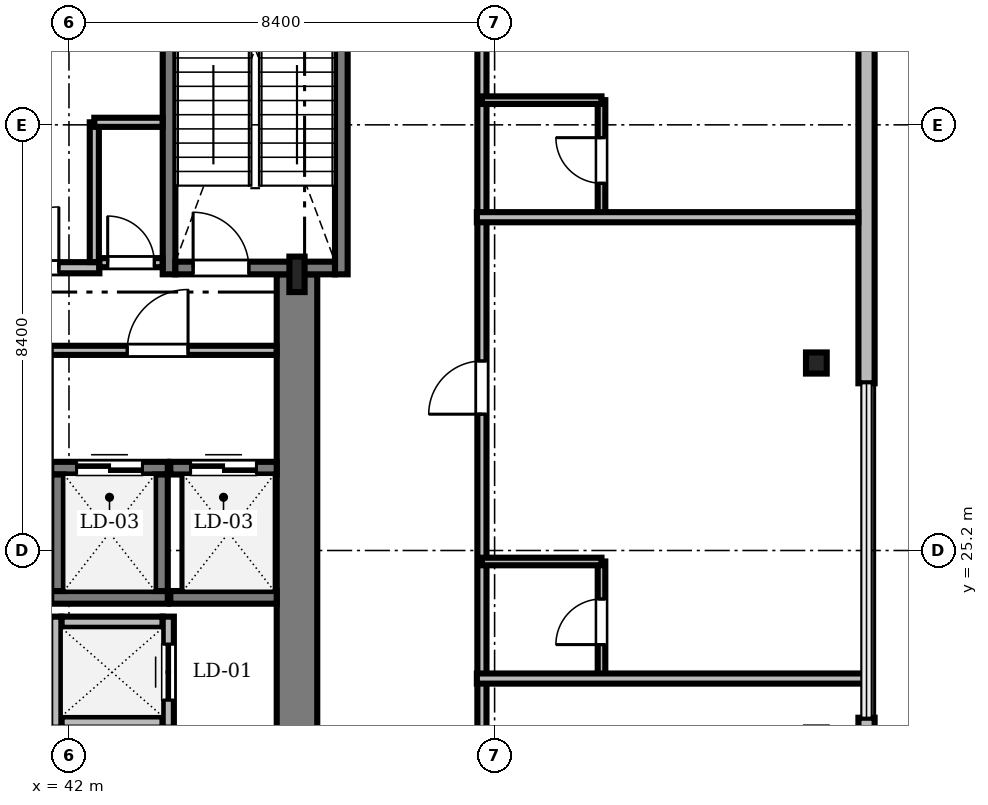
"""IFC4 building model, lengths in metres.
Left out: names, types, materials, properties, quantities, classifications, styles, units other than length and angle.
Written with IfcOpenShell. Run it as: python <this file> out.ifc"""

import sys

from ifc_helpers import new_model, si_unit, direction, frame, frame_2d, origin, origin_2d, place, context, subcontext, project, spatial, rectangle, i_section, extrude, source, transform, mapped, element, fill, save


model = new_model("IFC4")
c1 = context("Model", 3, precision=1e-05, world=origin(), true_north=direction((0.0, 1.0)))
c2 = subcontext(c1, "Body", "Model", "MODEL_VIEW")
j1 = project(units=[si_unit("LENGTHUNIT", "METRE"), si_unit("PLANEANGLEUNIT", "RADIAN")], contexts=[c1])
p1 = place(None, origin())
s1 = spatial("IfcSite", under=j1, at=p1, CompositionType="ELEMENT")
p2 = place(p1, origin())
s2 = spatial("IfcBuilding", under=s1, at=p2, CompositionType="ELEMENT")
p3 = place(p2, frame((0.0, 0.0, 222.3)))
s3 = spatial("IfcBuildingStorey", under=s2, at=p3, CompositionType="ELEMENT", Elevation=222.3)
m1 = source(origin(), c2, "Body", "SweptSolid", [
    extrude(rectangle(XDim=13.15, YDim=0.8, at=frame_2d((6.575, 0.0))), origin(), (0.0, 0.0, 1.0), 3.53),
])
p4 = place(p3, frame((46.5, 17.5, 0.0), z_axis=(0.0, 0.0, 1.0), x_axis=(0.0, 1.0, 0.0)))
e1 = element("IfcWall", 1, at=p4, inside=s3, PredefinedType="SHEAR", context=c2, shape_type="MappedRepresentation", body=[
    mapped(m1, transform((0.0, 0.0, 0.0), scale=1.0)),
])
m2 = source(origin(), c2, "Body", "SweptSolid", [
    extrude(i_section(OverallWidth=0.3, OverallDepth=0.7, WebThickness=0.017, FlangeThickness=0.032, FilletRadius=0.027, at=origin_2d()), origin(), (0.0, 0.0, 1.0), 3.53),
])
p5 = place(p3, frame((46.5, 30.65, 0.0), z_axis=(0.0, 0.0, 1.0), x_axis=(1.0, 0.0, 0.0)))
e2 = element("IfcColumn", 2, at=p5, inside=s3, PredefinedType="COLUMN", context=c2, shape_type="MappedRepresentation", body=[
    mapped(m2, transform((0.0, 0.0, 0.0), scale=1.0)),
])
m3 = source(origin(), c2, "Body", "SweptSolid", [
    extrude(i_section(OverallWidth=0.409, OverallDepth=0.417, WebThickness=0.021, FlangeThickness=0.033, FilletRadius=0.015, at=origin_2d()), origin(), (0.0, 0.0, 1.0), 3.53),
])
p6 = place(p3, frame((56.75, 28.9, 0.0), z_axis=(0.0, 0.0, 1.0), x_axis=(1.0, 0.0, 0.0)))
e3 = element("IfcColumn", 3, at=p6, inside=s3, PredefinedType="COLUMN", context=c2, shape_type="MappedRepresentation", body=[
    mapped(m3, transform((0.0, 0.0, 0.0), scale=1.0)),
])
m4 = source(origin(), c2, "Body", "SweptSolid", [
    extrude(rectangle(XDim=15.6, YDim=0.32, at=frame_2d((7.8, 0.0))), origin(), (0.0, 0.0, 1.0), 3.53),
])
p7 = place(p3, frame((57.74, 6.3, 0.0), z_axis=(0.0, 0.0, 1.0), x_axis=(0.0, 1.0, 0.0)))
e4 = element("IfcWall", 4, at=p7, inside=s3, PredefinedType="SOLIDWALL", context=c2, shape_type="MappedRepresentation", body=[
    mapped(m4, transform((0.0, 0.0, 0.0), scale=1.0)),
])
m5 = source(origin(), c2, "Body", "SweptSolid", [
    extrude(rectangle(XDim=1.4, YDim=2.3, at=frame_2d((0.7, 1.15))), frame((0.0, 0.17, 0.0), z_axis=(0.0, -1.0, 0.0), x_axis=(1.0, 0.0, 0.0)), (0.0, 0.0, 1.0), 0.34),
])
p8 = place(p7, frame((9.61, 0.0, 0.0)))
e5 = element("IfcOpeningElement", 5, at=p8, cuts=e4, PredefinedType="OPENING", context=c2, shape_type="MappedRepresentation", body=[
    mapped(m5, transform((0.0, 0.0, 0.0), scale=1.0)),
])
m6 = source(origin(), c2, "Body", "SweptSolid", [
    extrude(rectangle(XDim=2.2, YDim=2.4, at=frame_2d((1.1, 1.2))), frame((0.0, 0.17, 0.0), z_axis=(0.0, -1.0, 0.0), x_axis=(1.0, 0.0, 0.0)), (0.0, 0.0, 1.0), 0.34),
])
p9 = place(p7, frame((3.005, 0.0, 0.72)))
e6 = element("IfcOpeningElement", 6, at=p9, cuts=e4, PredefinedType="OPENING", context=c2, shape_type="MappedRepresentation", body=[
    mapped(m6, transform((0.0, 0.0, 0.0), scale=1.0)),
])
m7 = source(origin(), c2, "Body", "SweptSolid", [
    extrude(rectangle(XDim=15.6, YDim=0.32, at=frame_2d((7.8, 0.0))), origin(), (0.0, 0.0, 1.0), 3.53),
])
p10 = place(p3, frame((57.74, 28.5, 0.0), z_axis=(0.0, 0.0, 1.0), x_axis=(0.0, 1.0, 0.0)))
e7 = element("IfcWall", 7, at=p10, inside=s3, PredefinedType="SOLIDWALL", context=c2, shape_type="MappedRepresentation", body=[
    mapped(m7, transform((0.0, 0.0, 0.0), scale=1.0)),
])
p11 = place(p10, frame((10.395, 0.0, 0.72)))
e8 = element("IfcOpeningElement", 8, at=p11, cuts=e7, PredefinedType="OPENING", context=c2, shape_type="MappedRepresentation", body=[
    mapped(m6, transform((0.0, 0.0, 0.0), scale=1.0)),
])
m8 = source(origin(), c2, "Body", "SweptSolid", [
    extrude(rectangle(XDim=9.25, YDim=0.25, at=frame_2d((4.625, 0.0))), origin(), (0.0, 0.0, 1.0), 3.55),
])
for number, where, z_axis, x_axis in (
    (9, (43.975, 30.65, 0.0), (0.0, 0.0, 1.0), (0.0, 1.0, 0.0)),
    (10, (47.375, 30.65, 0.0), (0.0, 0.0, 1.0), (0.0, 1.0, 0.0)),
):
    element("IfcWall", number, at=place(p3, frame(where, z_axis=z_axis, x_axis=x_axis)), inside=s3, PredefinedType="SOLIDWALL", context=c2, shape_type="MappedRepresentation", body=[
        mapped(m8, transform((0.0, 0.0, 0.0), scale=1.0)),
    ])
m9 = source(origin(), c2, "Body", "SweptSolid", [
    extrude(rectangle(XDim=3.15, YDim=0.25, at=frame_2d((1.575, 0.0))), origin(), (0.0, 0.0, 1.0), 3.55),
])
p12 = place(p3, frame((44.1, 30.775, 0.0), z_axis=(0.0, 0.0, 1.0), x_axis=(1.0, 0.0, 0.0)))
e11 = element("IfcWall", 11, at=p12, inside=s3, PredefinedType="SOLIDWALL", context=c2, shape_type="MappedRepresentation", body=[
    mapped(m9, transform((0.0, 0.0, 0.0), scale=1.0)),
])
m10 = source(origin(), c2, "Body", "SweptSolid", [
    extrude(rectangle(XDim=1.1, YDim=2.2, at=frame_2d((0.55, 1.1))), frame((0.0, 0.135, 0.0), z_axis=(0.0, -1.0, 0.0), x_axis=(1.0, 0.0, 0.0)), (0.0, 0.0, 1.0), 0.27),
])
p13 = place(p12, frame((0.35, 0.0, 0.0)))
e12 = element("IfcOpeningElement", 12, at=p13, cuts=e11, PredefinedType="OPENING", context=c2, shape_type="MappedRepresentation", body=[
    mapped(m10, transform((0.0, 0.0, 0.0), scale=1.0)),
])
m11 = source(origin(), c2, "Body", "SweptSolid", [
    extrude(rectangle(XDim=2.8, YDim=0.22, at=frame_2d((1.4, 0.0))), origin(), (0.0, 0.0, 1.0), 3.53),
])
p14 = place(p3, frame((39.8, 30.78, 0.0), z_axis=(0.0, 0.0, 1.0), x_axis=(1.0, 0.0, 0.0)))
e13 = element("IfcWall", 13, at=p14, inside=s3, PredefinedType="SOLIDWALL", context=c2, shape_type="MappedRepresentation", body=[
    mapped(m11, transform((0.0, 0.0, 0.0), scale=1.0)),
])
m12 = source(origin(), c2, "Body", "SweptSolid", [
    extrude(rectangle(XDim=1.2, YDim=2.2, at=frame_2d((0.6, 1.1))), frame((0.0, 0.12, 0.0), z_axis=(0.0, -1.0, 0.0), x_axis=(1.0, 0.0, 0.0)), (0.0, 0.0, 1.0), 0.24),
])
p15 = place(p14, frame((0.8, 0.0, 0.0)))
e14 = element("IfcOpeningElement", 14, at=p15, cuts=e13, PredefinedType="OPENING", context=c2, shape_type="MappedRepresentation", body=[
    mapped(m12, transform((0.0, 0.0, 0.0), scale=1.0)),
])
m13 = source(origin(), c2, "Body", "SweptSolid", [
    extrude(rectangle(XDim=2.0, YDim=0.22, at=frame_2d((1.0, 0.0))), origin(), (0.0, 0.0, 1.0), 3.53),
])
for number, where, z_axis, x_axis in (
    (15, (41.85, 21.815, 0.0), (0.0, 0.0, 1.0), (1.0, 0.0, 0.0)),
    (16, (41.85, 23.785, 0.0), (0.0, 0.0, 1.0), (1.0, 0.0, 0.0)),
):
    element("IfcWall", number, at=place(p3, frame(where, z_axis=z_axis, x_axis=x_axis)), inside=s3, PredefinedType="SOLIDWALL", context=c2, shape_type="MappedRepresentation", body=[
        mapped(m13, transform((0.0, 0.0, 0.0), scale=1.0)),
    ])
m14 = source(origin(), c2, "Body", "SweptSolid", [
    extrude(rectangle(XDim=2.19, YDim=0.22, at=frame_2d((1.095, 0.0))), origin(), (0.0, 0.0, 1.0), 3.53),
])
p16 = place(p3, frame((41.74, 21.705, 0.0), z_axis=(0.0, 0.0, 1.0), x_axis=(0.0, 1.0, 0.0)))
e17 = element("IfcWall", 17, at=p16, inside=s3, PredefinedType="SOLIDWALL", context=c2, shape_type="MappedRepresentation", body=[
    mapped(m14, transform((0.0, 0.0, 0.0), scale=1.0)),
])
p17 = place(p3, frame((43.96, 21.705, 0.0), z_axis=(0.0, 0.0, 1.0), x_axis=(0.0, 1.0, 0.0)))
e18 = element("IfcWall", 18, at=p17, inside=s3, PredefinedType="SOLIDWALL", context=c2, shape_type="MappedRepresentation", body=[
    mapped(m14, transform((0.0, 0.0, 0.0), scale=1.0)),
])
m15 = source(origin(), c2, "Body", "SweptSolid", [
    extrude(rectangle(XDim=1.1, YDim=2.2, at=frame_2d((0.55, 1.1))), frame((0.0, 0.12, 0.0), z_axis=(0.0, -1.0, 0.0), x_axis=(1.0, 0.0, 0.0)), (0.0, 0.0, 1.0), 0.24),
])
p18 = place(p17, frame((0.545, 0.0, 0.0)))
e19 = element("IfcOpeningElement", 19, at=p18, cuts=e18, PredefinedType="OPENING", context=c2, shape_type="MappedRepresentation", body=[
    mapped(m15, transform((0.0, 0.0, 0.0), scale=1.0)),
])
m16 = source(origin(), c2, "Body", "SweptSolid", [
    extrude(rectangle(XDim=2.3, YDim=0.25, at=frame_2d((1.15, 0.0))), origin(), (0.0, 0.0, 1.0), 3.53),
])
p19 = place(p3, frame((41.65, 24.275, 0.0), z_axis=(0.0, 0.0, 1.0), x_axis=(1.0, 0.0, 0.0)))
e20 = element("IfcWall", 20, at=p19, inside=s3, PredefinedType="SOLIDWALL", context=c2, shape_type="MappedRepresentation", body=[
    mapped(m16, transform((0.0, 0.0, 0.0), scale=1.0)),
])
p20 = place(p3, frame((41.65, 26.825, 0.0), z_axis=(0.0, 0.0, 1.0), x_axis=(1.0, 0.0, 0.0)))
e21 = element("IfcWall", 21, at=p20, inside=s3, PredefinedType="SOLIDWALL", context=c2, shape_type="MappedRepresentation", body=[
    mapped(m16, transform((0.0, 0.0, 0.0), scale=1.0)),
])
m17 = source(origin(), c2, "Body", "SweptSolid", [
    extrude(rectangle(XDim=1.3, YDim=2.3, at=frame_2d((0.65, 1.15))), frame((0.0, 0.135, 0.0), z_axis=(0.0, -1.0, 0.0), x_axis=(1.0, 0.0, 0.0)), (0.0, 0.0, 1.0), 0.27),
])
p21 = place(p20, frame((0.5, 0.0, 0.0)))
e22 = element("IfcOpeningElement", 22, at=p21, cuts=e21, PredefinedType="OPENING", context=c2, shape_type="MappedRepresentation", body=[
    mapped(m17, transform((0.0, 0.0, 0.0), scale=1.0)),
])
for number, where, z_axis, x_axis in (
    (23, (41.775, 24.4, 0.0), (0.0, 0.0, 1.0), (0.0, 1.0, 0.0)),
    (24, (43.825, 24.4, 0.0), (0.0, 0.0, 1.0), (0.0, 1.0, 0.0)),
):
    element("IfcWall", number, at=place(p3, frame(where, z_axis=z_axis, x_axis=x_axis)), inside=s3, PredefinedType="SOLIDWALL", context=c2, shape_type="MappedRepresentation", body=[
        mapped(m16, transform((0.0, 0.0, 0.0), scale=1.0)),
    ])
m18 = source(origin(), c2, "Body", "SweptSolid", [
    extrude(rectangle(XDim=2.1, YDim=0.25, at=frame_2d((1.05, 0.0))), origin(), (0.0, 0.0, 1.0), 3.53),
])
p22 = place(p3, frame((44.0, 24.275, 0.0), z_axis=(0.0, 0.0, 1.0), x_axis=(1.0, 0.0, 0.0)))
e25 = element("IfcWall", 25, at=p22, inside=s3, PredefinedType="SOLIDWALL", context=c2, shape_type="MappedRepresentation", body=[
    mapped(m18, transform((0.0, 0.0, 0.0), scale=1.0)),
])
p23 = place(p3, frame((44.0, 26.825, 0.0), z_axis=(0.0, 0.0, 1.0), x_axis=(1.0, 0.0, 0.0)))
e26 = element("IfcWall", 26, at=p23, inside=s3, PredefinedType="SOLIDWALL", context=c2, shape_type="MappedRepresentation", body=[
    mapped(m18, transform((0.0, 0.0, 0.0), scale=1.0)),
])
p24 = place(p23, frame((0.4, 0.0, 0.0)))
e27 = element("IfcOpeningElement", 27, at=p24, cuts=e26, PredefinedType="OPENING", context=c2, shape_type="MappedRepresentation", body=[
    mapped(m17, transform((0.0, 0.0, 0.0), scale=1.0)),
])
m19 = source(origin(), c2, "Body", "SweptSolid", [
    extrude(rectangle(XDim=27.53, YDim=0.18, at=frame_2d((13.765, 0.0))), origin(), (0.0, 0.0, 1.0), 2.972),
])
p25 = place(p3, frame((50.15, 13.57, 0.0), z_axis=(0.0, 0.0, 1.0), x_axis=(0.0, 1.0, 0.0)))
e28 = element("IfcWall", 28, at=p25, inside=s3, PredefinedType="PARTITIONING", context=c2, shape_type="MappedRepresentation", body=[
    mapped(m19, transform((0.0, 0.0, 0.0), scale=1.0)),
])
m20 = source(origin(), c2, "Body", "SweptSolid", [
    extrude(rectangle(XDim=1.05, YDim=2.2, at=frame_2d((0.525, 1.1))), frame((0.0, 0.1, 0.0), z_axis=(0.0, -1.0, 0.0), x_axis=(1.0, 0.0, 0.0)), (0.0, 0.0, 1.0), 0.2),
])
p26 = place(p25, frame((5.217, 0.0, 0.0)))
e29 = element("IfcOpeningElement", 29, at=p26, cuts=e28, PredefinedType="OPENING", context=c2, shape_type="MappedRepresentation", body=[
    mapped(m20, transform((0.0, 0.0, 0.0), scale=1.0)),
])
p27 = place(p25, frame((14.32, 0.0, 0.0)))
e30 = element("IfcOpeningElement", 30, at=p27, cuts=e28, PredefinedType="OPENING", context=c2, shape_type="MappedRepresentation", body=[
    mapped(m20, transform((0.0, 0.0, 0.0), scale=1.0)),
])
p28 = place(p25, frame((23.423, 0.0, 0.0)))
e31 = element("IfcOpeningElement", 31, at=p28, cuts=e28, PredefinedType="OPENING", context=c2, shape_type="MappedRepresentation", body=[
    mapped(m20, transform((0.0, 0.0, 0.0), scale=1.0)),
])
m21 = source(origin(), c2, "Body", "SweptSolid", [
    extrude(rectangle(XDim=4.548, YDim=0.18, at=frame_2d((2.274, 0.0))), origin(), (0.0, 0.0, 1.0), 3.162),
])
p29 = place(p3, frame((41.55, 29.15, 0.0), z_axis=(0.0, 0.0, 1.0), x_axis=(1.0, 0.0, 0.0)))
e32 = element("IfcWall", 32, at=p29, inside=s3, PredefinedType="PARTITIONING", context=c2, shape_type="MappedRepresentation", body=[
    mapped(m21, transform((0.0, 0.0, 0.0), scale=1.0)),
])
m22 = source(origin(), c2, "Body", "SweptSolid", [
    extrude(rectangle(XDim=1.2, YDim=2.2, at=frame_2d((0.6, 1.1))), frame((0.0, 0.1, 0.0), z_axis=(0.0, -1.0, 0.0), x_axis=(1.0, 0.0, 0.0)), (0.0, 0.0, 1.0), 0.2),
])
p30 = place(p29, frame((1.6, 0.0, 0.0)))
e33 = element("IfcOpeningElement", 33, at=p30, cuts=e32, PredefinedType="OPENING", context=c2, shape_type="MappedRepresentation", body=[
    mapped(m22, transform((0.0, 0.0, 0.0), scale=1.0)),
])
m23 = source(origin(), c2, "Body", "SweptSolid", [
    extrude(rectangle(XDim=2.29, YDim=0.15, at=frame_2d((1.145, 0.0))), origin(), (0.0, 0.0, 1.0), 3.222),
])
p31 = place(p3, frame((52.51, 22.693, 0.0), z_axis=(0.0, 0.0, 1.0), x_axis=(0.0, 1.0, 0.0)))
e34 = element("IfcWall", 34, at=p31, inside=s3, PredefinedType="PARTITIONING", context=c2, shape_type="MappedRepresentation", body=[
    mapped(m23, transform((0.0, 0.0, 0.0), scale=1.0)),
])
m24 = source(origin(), c2, "Body", "SweptSolid", [
    extrude(rectangle(XDim=0.9, YDim=2.1, at=frame_2d((0.45, 1.05))), frame((0.0, 0.085, 0.0), z_axis=(0.0, -1.0, 0.0), x_axis=(1.0, 0.0, 0.0)), (0.0, 0.0, 1.0), 0.17),
])
p32 = place(p31, frame((0.65, 0.0, 0.0)))
e35 = element("IfcOpeningElement", 35, at=p32, cuts=e34, PredefinedType="OPENING", context=c2, shape_type="MappedRepresentation", body=[
    mapped(m24, transform((0.0, 0.0, 0.0), scale=1.0)),
])
m25 = source(origin(), c2, "Body", "SweptSolid", [
    extrude(rectangle(XDim=2.29, YDim=0.15, at=frame_2d((1.145, 0.0))), origin(), (0.0, 0.0, 1.0), 3.53),
])
p33 = place(p3, frame((52.51, 31.797, 0.0), z_axis=(0.0, 0.0, 1.0), x_axis=(0.0, 1.0, 0.0)))
e36 = element("IfcWall", 36, at=p33, inside=s3, PredefinedType="PARTITIONING", context=c2, shape_type="MappedRepresentation", body=[
    mapped(m25, transform((0.0, 0.0, 0.0), scale=1.0)),
])
p34 = place(p33, frame((0.65, 0.0, 0.0)))
e37 = element("IfcOpeningElement", 37, at=p34, cuts=e36, PredefinedType="OPENING", context=c2, shape_type="MappedRepresentation", body=[
    mapped(m24, transform((0.0, 0.0, 0.0), scale=1.0)),
])
m26 = source(origin(), c2, "Body", "SweptSolid", [
    extrude(rectangle(XDim=1.248, YDim=0.18, at=frame_2d((0.624, 0.0))), origin(), (0.0, 0.0, 1.0), 3.53),
])
p35 = place(p3, frame((42.6, 30.88, 0.0), z_axis=(0.0, 0.0, 1.0), x_axis=(1.0, 0.0, 0.0)))
e38 = element("IfcWall", 38, at=p35, inside=s3, PredefinedType="PARTITIONING", context=c2, shape_type="MappedRepresentation", body=[
    mapped(m26, transform((0.0, 0.0, 0.0), scale=1.0)),
])
m27 = source(origin(), c2, "Body", "SweptSolid", [
    extrude(rectangle(XDim=0.92, YDim=2.1, at=frame_2d((0.46, 1.05))), frame((0.0, 0.1, 0.0), z_axis=(0.0, -1.0, 0.0), x_axis=(1.0, 0.0, 0.0)), (0.0, 0.0, 1.0), 0.2),
])
p36 = place(p35, frame((0.164, 0.0, 0.0)))
e39 = element("IfcOpeningElement", 39, at=p36, cuts=e38, PredefinedType="OPENING", context=c2, shape_type="MappedRepresentation", body=[
    mapped(m27, transform((0.0, 0.0, 0.0), scale=1.0)),
])
m28 = source(origin(), c2, "Body", "SweptSolid", [
    extrude(rectangle(XDim=7.72, YDim=0.2, at=frame_2d((3.86, 0.0))), origin(), (0.0, 0.0, 1.0), 2.772),
])
p37 = place(p3, frame((50.05, 22.673, 0.0), z_axis=(0.0, 0.0, 1.0), x_axis=(1.0, 0.0, 0.0)))
e40 = element("IfcWall", 40, at=p37, inside=s3, PredefinedType="PARTITIONING", context=c2, shape_type="MappedRepresentation", body=[
    mapped(m28, transform((0.0, 0.0, 0.0), scale=1.0)),
])
m29 = source(origin(), c2, "Body", "SweptSolid", [
    extrude(rectangle(XDim=7.528, YDim=0.2, at=frame_2d((3.764, 0.0))), origin(), (0.0, 0.0, 1.0), 2.772),
])
p38 = place(p3, frame((50.05, 31.777, 0.0), z_axis=(0.0, 0.0, 1.0), x_axis=(1.0, 0.0, 0.0)))
e41 = element("IfcWall", 41, at=p38, inside=s3, PredefinedType="PARTITIONING", context=c2, shape_type="MappedRepresentation", body=[
    mapped(m29, transform((0.0, 0.0, 0.0), scale=1.0)),
])
m30 = source(origin(), c2, "Body", "SweptSolid", [
    extrude(rectangle(XDim=2.758, YDim=0.18, at=frame_2d((1.379, 0.0))), origin(), (0.0, 0.0, 1.0), 3.53),
])
p39 = place(p3, frame((42.5, 30.892, 0.0), z_axis=(0.0, 0.0, 1.0), x_axis=(0.0, 1.0, 0.0)))
e42 = element("IfcWall", 42, at=p39, inside=s3, PredefinedType="PARTITIONING", context=c2, shape_type="MappedRepresentation", body=[
    mapped(m30, transform((0.0, 0.0, 0.0), scale=1.0)),
])
m31 = source(origin(), c2, "Body", "SweptSolid", [
    extrude(rectangle(XDim=2.36, YDim=0.15, at=frame_2d((1.18, 0.0))), origin(), (0.0, 0.0, 1.0), 3.53),
])
for number, where, z_axis, x_axis in (
    (43, (50.15, 24.983, 0.0), (0.0, 0.0, 1.0), (1.0, 0.0, 0.0)),
    (44, (50.15, 34.087, 0.0), (0.0, 0.0, 1.0), (1.0, 0.0, 0.0)),
):
    element("IfcWall", number, at=place(p3, frame(where, z_axis=z_axis, x_axis=x_axis)), inside=s3, PredefinedType="PARTITIONING", context=c2, shape_type="MappedRepresentation", body=[
        mapped(m31, transform((0.0, 0.0, 0.0), scale=1.0)),
    ])
m32 = source(origin(), c2, "Body", "SweptSolid", [
    extrude(rectangle(XDim=1.348, YDim=0.18, at=frame_2d((0.674, 0.0))), origin(), (0.0, 0.0, 1.0), 3.53),
])
p40 = place(p3, frame((42.5, 33.65, 0.0), z_axis=(0.0, 0.0, 1.0), x_axis=(1.0, 0.0, 0.0)))
e45 = element("IfcWall", 45, at=p40, inside=s3, PredefinedType="PARTITIONING", context=c2, shape_type="MappedRepresentation", body=[
    mapped(m32, transform((0.0, 0.0, 0.0), scale=1.0)),
])
m33 = source(origin(), c2, "Body", "SweptSolid", [
    extrude(rectangle(XDim=1.1, YDim=2.2, at=frame_2d((0.55, 1.1))), frame((0.0, 0.025, 0.0), z_axis=(0.0, -1.0, 0.0), x_axis=(1.0, 0.0, 0.0)), (0.0, 0.0, 1.0), 0.05),
])
p41 = place(p13, origin())
e46 = element("IfcDoor", 46, at=p41, inside=s3, OperationType="SINGLE_SWING_LEFT", PredefinedType="DOOR", context=c2, shape_type="MappedRepresentation", body=[
    mapped(m33, transform((0.0, 0.0, 0.0), scale=1.0)),
])
fill(e12, e46)
m34 = source(origin(), c2, "Body", "SweptSolid", [
    extrude(rectangle(XDim=1.2, YDim=2.2, at=frame_2d((0.6, 1.1))), frame((0.0, 0.025, 0.0), z_axis=(0.0, -1.0, 0.0), x_axis=(1.0, 0.0, 0.0)), (0.0, 0.0, 1.0), 0.05),
])
p42 = place(p15, origin())
e47 = element("IfcDoor", 47, at=p42, inside=s3, OperationType="SINGLE_SWING_RIGHT", PredefinedType="DOOR", context=c2, shape_type="MappedRepresentation", body=[
    mapped(m34, transform((0.0, 0.0, 0.0), scale=1.0)),
])
fill(e14, e47)
p43 = place(p18, origin())
e48 = element("IfcDoor", 48, at=p43, inside=s3, OperationType="DOUBLE_DOOR_SLIDING", PredefinedType="DOOR", context=c2, shape_type="MappedRepresentation", body=[
    mapped(m33, transform((0.0, 0.0, 0.0), scale=1.0)),
])
fill(e19, e48)
m35 = source(origin(), c2, "Body", "SweptSolid", [
    extrude(rectangle(XDim=1.3, YDim=2.3, at=frame_2d((0.65, 1.15))), frame((0.0, 0.025, 0.0), z_axis=(0.0, -1.0, 0.0), x_axis=(1.0, 0.0, 0.0)), (0.0, 0.0, 1.0), 0.05),
])
p44 = place(p21, origin())
e49 = element("IfcDoor", 49, at=p44, inside=s3, OperationType="DOUBLE_DOOR_SLIDING", PredefinedType="DOOR", context=c2, shape_type="MappedRepresentation", body=[
    mapped(m35, transform((0.0, 0.0, 0.0), scale=1.0)),
])
fill(e22, e49)
p45 = place(p24, origin())
e50 = element("IfcDoor", 50, at=p45, inside=s3, OperationType="DOUBLE_DOOR_SLIDING", PredefinedType="DOOR", context=c2, shape_type="MappedRepresentation", body=[
    mapped(m35, transform((0.0, 0.0, 0.0), scale=1.0)),
])
fill(e27, e50)
m36 = source(origin(), c2, "Body", "SweptSolid", [
    extrude(rectangle(XDim=1.05, YDim=2.2, at=frame_2d((0.525, 1.1))), frame((0.0, 0.025, 0.0), z_axis=(0.0, -1.0, 0.0), x_axis=(1.0, 0.0, 0.0)), (0.0, 0.0, 1.0), 0.05),
])
p46 = place(p27, origin())
e51 = element("IfcDoor", 51, at=p46, inside=s3, OperationType="SINGLE_SWING_LEFT", PredefinedType="DOOR", context=c2, shape_type="MappedRepresentation", body=[
    mapped(m36, transform((0.0, 0.0, 0.0), scale=1.0)),
])
fill(e30, e51)
p47 = place(p30, origin())
e52 = element("IfcDoor", 52, at=p47, inside=s3, OperationType="SINGLE_SWING_RIGHT", PredefinedType="DOOR", context=c2, shape_type="MappedRepresentation", body=[
    mapped(m34, transform((0.0, 0.0, 0.0), scale=1.0)),
])
fill(e33, e52)
m37 = source(origin(), c2, "Body", "SweptSolid", [
    extrude(rectangle(XDim=0.9, YDim=2.1, at=frame_2d((0.45, 1.05))), frame((0.0, 0.025, 0.0), z_axis=(0.0, -1.0, 0.0), x_axis=(1.0, 0.0, 0.0)), (0.0, 0.0, 1.0), 0.05),
])
p48 = place(p32, origin())
e53 = element("IfcDoor", 53, at=p48, inside=s3, OperationType="SINGLE_SWING_LEFT", PredefinedType="DOOR", context=c2, shape_type="MappedRepresentation", body=[
    mapped(m37, transform((0.0, 0.0, 0.0), scale=1.0)),
])
fill(e35, e53)
p49 = place(p34, origin())
e54 = element("IfcDoor", 54, at=p49, inside=s3, OperationType="SINGLE_SWING_RIGHT", PredefinedType="DOOR", context=c2, shape_type="MappedRepresentation", body=[
    mapped(m37, transform((0.0, 0.0, 0.0), scale=1.0)),
])
fill(e37, e54)
m38 = source(origin(), c2, "Body", "SweptSolid", [
    extrude(rectangle(XDim=0.92, YDim=2.1, at=frame_2d((0.46, 1.05))), frame((0.0, 0.025, 0.0), z_axis=(0.0, -1.0, 0.0), x_axis=(1.0, 0.0, 0.0)), (0.0, 0.0, 1.0), 0.05),
])
p50 = place(p36, origin())
e55 = element("IfcDoor", 55, at=p50, inside=s3, OperationType="SINGLE_SWING_LEFT", PredefinedType="DOOR", context=c2, shape_type="MappedRepresentation", body=[
    mapped(m38, transform((0.0, 0.0, 0.0), scale=1.0)),
])
fill(e39, e55)
save(model, sys.argv[1])
